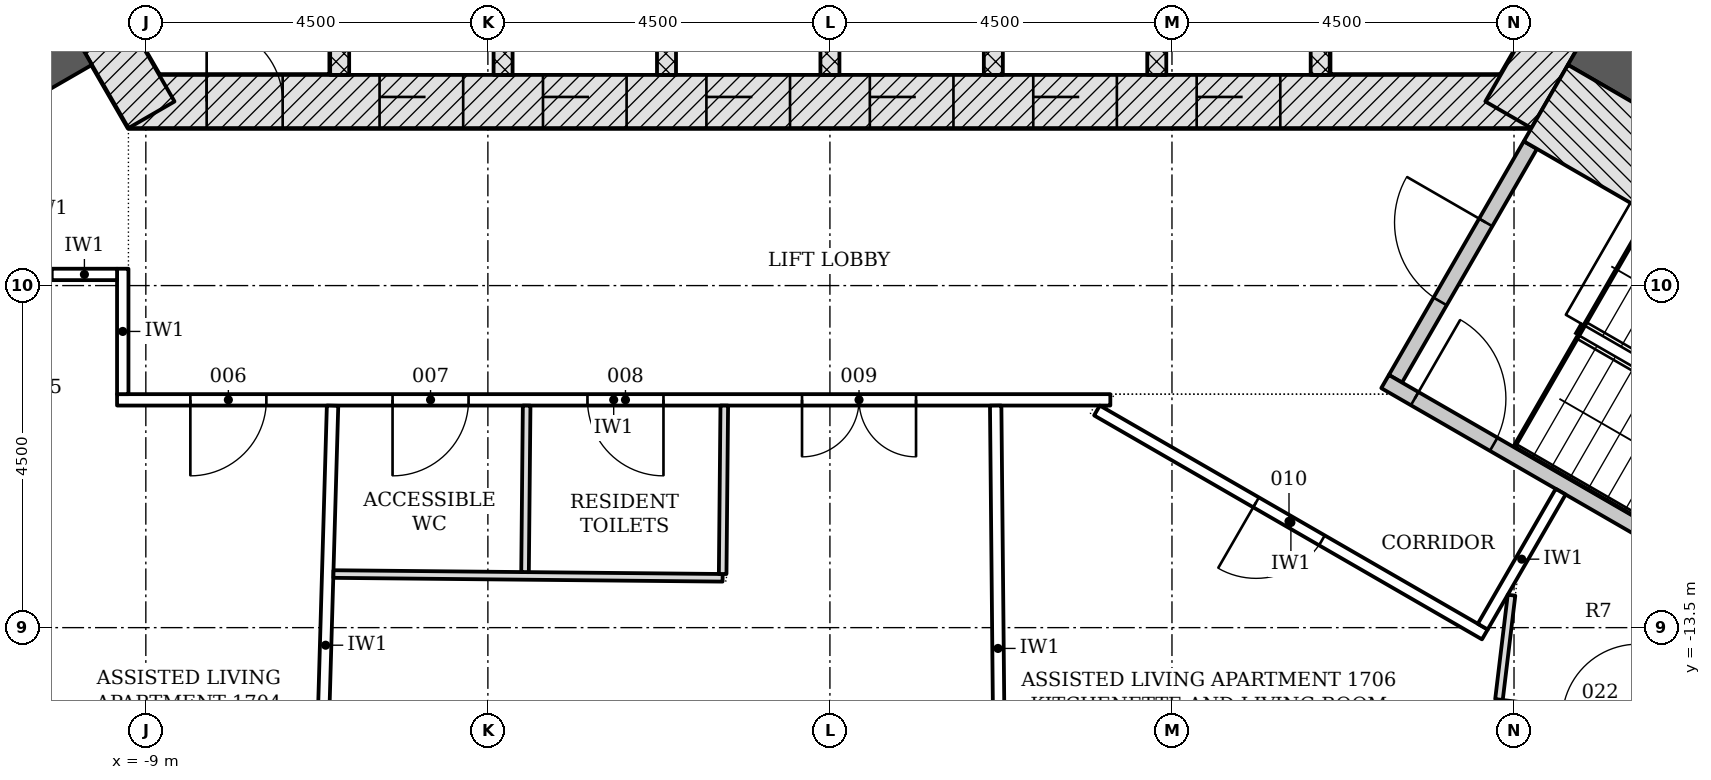
"""IFC4 building model, lengths in metres.
Left out: names, types, materials, properties, quantities, classifications, styles, units other than length and angle.
Written with IfcOpenShell. Run it as: python <this file> out.ifc"""

import sys

from ifc_helpers import new_model, si_unit, direction, frame, frame_2d, origin, place, context, subcontext, project, spatial, rectangle, extrude, element, fill, save


model = new_model("IFC4")
c1 = context("Model", 3, precision=1e-05, world=origin(), true_north=direction((0.0, 1.0)))
c2 = subcontext(c1, "Body", "Model", "MODEL_VIEW")
j1 = project(units=[si_unit("LENGTHUNIT", "METRE"), si_unit("PLANEANGLEUNIT", "RADIAN")], contexts=[c1])
p1 = place(None, origin())
s1 = spatial("IfcSite", under=j1, at=p1, CompositionType="ELEMENT")
p2 = place(p1, origin())
s2 = spatial("IfcBuilding", under=s1, at=p2, CompositionType="ELEMENT")
p3 = place(p2, frame((0.0, 0.0, 69.0)))
s3 = spatial("IfcBuildingStorey", under=s2, at=p3, CompositionType="ELEMENT", Elevation=69.0)
p4 = place(p3, frame((-9.229, -6.578, -0.2), z_axis=(0.0, 0.0, 1.0), x_axis=(1.0, 0.0, 0.0)))
e1 = element("IfcWall", 1, at=p4, inside=s3, PredefinedType="SHEAR", context=c2, shape_type="SweptSolid", body=[
    extrude(rectangle(XDim=18.458, YDim=0.7, at=frame_2d((9.229, 0.0))), origin(), (0.0, 0.0, 1.0), 3.6),
])
p5 = place(p4, frame((3.304, 0.0, 0.2)))
e2 = element("IfcOpeningElement", 2, at=p5, cuts=e1, PredefinedType="OPENING", context=c2, shape_type="SweptSolid", body=[
    extrude(rectangle(XDim=1.1, YDim=2.1, at=frame_2d((0.55, 1.05))), frame((0.0, 0.36, 0.0), z_axis=(0.0, -1.0, 0.0), x_axis=(1.0, 0.0, 0.0)), (0.0, 0.0, 1.0), 0.72),
])
p6 = place(p4, frame((5.454, 0.0, 0.2)))
e3 = element("IfcOpeningElement", 3, at=p6, cuts=e1, PredefinedType="OPENING", context=c2, shape_type="SweptSolid", body=[
    extrude(rectangle(XDim=1.1, YDim=2.1, at=frame_2d((0.55, 1.05))), frame((0.0, 0.36, 0.0), z_axis=(0.0, -1.0, 0.0), x_axis=(1.0, 0.0, 0.0)), (0.0, 0.0, 1.0), 0.72),
])
p7 = place(p4, frame((7.604, 0.0, 0.2)))
e4 = element("IfcOpeningElement", 4, at=p7, cuts=e1, PredefinedType="OPENING", context=c2, shape_type="SweptSolid", body=[
    extrude(rectangle(XDim=1.1, YDim=2.1, at=frame_2d((0.55, 1.05))), frame((0.0, 0.36, 0.0), z_axis=(0.0, -1.0, 0.0), x_axis=(1.0, 0.0, 0.0)), (0.0, 0.0, 1.0), 0.72),
])
p8 = place(p4, frame((9.754, 0.0, 0.2)))
e5 = element("IfcOpeningElement", 5, at=p8, cuts=e1, PredefinedType="OPENING", context=c2, shape_type="SweptSolid", body=[
    extrude(rectangle(XDim=1.1, YDim=2.1, at=frame_2d((0.55, 1.05))), frame((0.0, 0.36, 0.0), z_axis=(0.0, -1.0, 0.0), x_axis=(1.0, 0.0, 0.0)), (0.0, 0.0, 1.0), 0.72),
])
p9 = place(p4, frame((11.904, 0.0, 0.2)))
e6 = element("IfcOpeningElement", 6, at=p9, cuts=e1, PredefinedType="OPENING", context=c2, shape_type="SweptSolid", body=[
    extrude(rectangle(XDim=1.1, YDim=2.1, at=frame_2d((0.55, 1.05))), frame((0.0, 0.36, 0.0), z_axis=(0.0, -1.0, 0.0), x_axis=(1.0, 0.0, 0.0)), (0.0, 0.0, 1.0), 0.72),
])
p10 = place(p4, frame((14.054, 0.0, 0.2)))
e7 = element("IfcOpeningElement", 7, at=p10, cuts=e1, PredefinedType="OPENING", context=c2, shape_type="SweptSolid", body=[
    extrude(rectangle(XDim=1.1, YDim=2.1, at=frame_2d((0.55, 1.05))), frame((0.0, 0.36, 0.0), z_axis=(0.0, -1.0, 0.0), x_axis=(1.0, 0.0, 0.0)), (0.0, 0.0, 1.0), 0.72),
])
p11 = place(p4, frame((1.029, 0.0, 0.2)))
e8 = element("IfcOpeningElement", 8, at=p11, cuts=e1, PredefinedType="OPENING", context=c2, shape_type="SweptSolid", body=[
    extrude(rectangle(XDim=1.0, YDim=2.1, at=frame_2d((0.5, 1.05))), frame((0.0, 0.36, 0.0), z_axis=(0.0, -1.0, 0.0), x_axis=(1.0, 0.0, 0.0)), (0.0, 0.0, 1.0), 0.72),
])
for number, where, z_axis, x_axis in (
    (9, (8.926, -6.753, -0.2), (0.0, 0.0, 1.0), (0.5, 0.866, 0.0)),
    (10, (-10.311, -4.353, -0.2), (0.0, 0.0, 1.0), (0.5, -0.866, 0.0)),
):
    element("IfcWall", number, at=place(p3, frame(where, z_axis=z_axis, x_axis=x_axis)), inside=s3, PredefinedType="SHEAR", context=c2, shape_type="SweptSolid", body=[
        extrude(rectangle(XDim=2.771, YDim=0.7, at=frame_2d((1.386, 0.0))), origin(), (0.0, 0.0, 1.0), 3.6),
    ])
for number, where, z_axis, x_axis in (
    (11, (-9.922, -5.728, -0.2), (0.0, 0.0, 1.0), (-0.866, -0.5, 0.0)),
    (12, (9.922, -5.728, -0.2), (0.0, 0.0, 1.0), (0.866, -0.5, 0.0)),
):
    element("IfcWall", number, at=place(p3, frame(where, z_axis=z_axis, x_axis=x_axis)), inside=s3, PredefinedType="SHEAR", context=c2, shape_type="SweptSolid", body=[
        extrude(rectangle(XDim=13.381, YDim=0.85, at=frame_2d((6.691, 0.0))), origin(), (0.0, 0.0, 1.0), 3.6),
    ])
for number, where, z_axis, x_axis in (
    (13, (-6.45, -6.228, -0.2), (0.0, 0.0, 1.0), (0.0, 1.0, 0.0)),
    (14, (-4.3, -6.228, -0.2), (0.0, 0.0, 1.0), (0.0, 1.0, 0.0)),
    (15, (-2.15, -6.228, -0.2), (0.0, 0.0, 1.0), (0.0, 1.0, 0.0)),
    (16, (0.0, -6.228, -0.2), (0.0, 0.0, 1.0), (0.0, 1.0, 0.0)),
    (17, (2.15, -6.228, -0.2), (0.0, 0.0, 1.0), (0.0, 1.0, 0.0)),
    (18, (4.3, -6.228, -0.2), (0.0, 0.0, 1.0), (0.0, 1.0, 0.0)),
    (19, (6.45, -6.228, -0.2), (0.0, 0.0, 1.0), (0.0, 1.0, 0.0)),
):
    element("IfcWall", number, at=place(p3, frame(where, z_axis=z_axis, x_axis=x_axis)), inside=s3, PredefinedType="PARTITIONING", context=c2, shape_type="SweptSolid", body=[
        extrude(rectangle(XDim=2.5, YDim=0.25, at=frame_2d((1.25, 0.0))), origin(), (0.0, 0.0, 1.0), 3.6),
    ])
p12 = place(p3, frame((-10.424, -4.858, -0.2), z_axis=(0.0, 0.0, 1.0), x_axis=(-0.866033125095, -0.499986626058, 0.0)))
e20 = element("IfcWall", 20, at=p12, inside=s3, PredefinedType="SHEAR", context=c2, shape_type="SweptSolid", body=[
    extrude(rectangle(XDim=7.2, YDim=1.161, at=frame_2d((3.6, 0.0))), origin(), (0.0, 0.0, 1.0), 3.6),
])
p13 = place(p3, frame((7.44, -10.226, -0.2), z_axis=(0.0, 0.0, 1.0), x_axis=(0.500022077904, 0.866012656725, 0.0)))
e21 = element("IfcWall", 21, at=p13, inside=s3, PredefinedType="SHEAR", context=c2, shape_type="SweptSolid", body=[
    extrude(rectangle(XDim=3.55, YDim=0.2, at=frame_2d((1.775, 0.0))), origin(), (0.0, 0.0, 1.0), 3.6),
])
p14 = place(p13, frame((1.175, 0.0, 0.2)))
e22 = element("IfcOpeningElement", 22, at=p14, cuts=e21, PredefinedType="OPENING", context=c2, shape_type="SweptSolid", body=[
    extrude(rectangle(XDim=1.2, YDim=2.1, at=frame_2d((0.6, 1.05))), frame((0.0, 0.11, 0.0), z_axis=(0.0, -1.0, 0.0), x_axis=(1.0, 0.0, 0.0)), (0.0, 0.0, 1.0), 0.22),
])
p15 = place(p3, frame((7.304, -10.262, -0.2), z_axis=(0.0, 0.0, 1.0), x_axis=(0.866026594901, -0.49999793692, 0.0)))
e23 = element("IfcWall", 23, at=p15, inside=s3, PredefinedType="SHEAR", context=c2, shape_type="SweptSolid", body=[
    extrude(rectangle(XDim=5.6, YDim=0.2, at=frame_2d((2.8, 0.0))), origin(), (0.0, 0.0, 1.0), 3.6),
])
p16 = place(p15, frame((0.45, 0.0, 0.2)))
e24 = element("IfcOpeningElement", 24, at=p16, cuts=e23, PredefinedType="OPENING", context=c2, shape_type="SweptSolid", body=[
    extrude(rectangle(XDim=1.2, YDim=2.1, at=frame_2d((0.6, 1.05))), frame((0.0, 0.11, 0.0), z_axis=(0.0, -1.0, 0.0), x_axis=(1.0, 0.0, 0.0)), (0.0, 0.0, 1.0), 0.22),
])
p17 = place(p3, frame((9.419, -6.599, -0.2), z_axis=(0.0, 0.0, 1.0), x_axis=(0.866033125095, -0.499986626058, 0.0)))
e25 = element("IfcWall", 25, at=p17, inside=s3, PredefinedType="SHEAR", context=c2, shape_type="SweptSolid", body=[
    extrude(rectangle(XDim=7.2, YDim=1.161, at=frame_2d((3.6, 0.0))), origin(), (0.0, 0.0, 1.0), 3.6),
])
p18 = place(p3, frame((3.689, -10.503, 0.0), z_axis=(0.0, 0.0, 1.0), x_axis=(-1.0, 0.0, 0.0)))
e26 = element("IfcWall", 26, at=p18, inside=s3, PredefinedType="PARTITIONING", context=c2, shape_type="SweptSolid", body=[
    extrude(rectangle(XDim=13.068, YDim=0.15, at=frame_2d((6.534, 0.0))), origin(), (0.0, 0.0, 1.0), 2.778),
])
p19 = place(p18, frame((11.103, 0.0, 0.0)))
e27 = element("IfcOpeningElement", 27, at=p19, cuts=e26, PredefinedType="OPENING", context=c2, shape_type="SweptSolid", body=[
    extrude(rectangle(XDim=1.0, YDim=2.1, at=frame_2d((0.5, 1.05))), frame((0.0, 0.085, 0.0), z_axis=(0.0, -1.0, 0.0), x_axis=(1.0, 0.0, 0.0)), (0.0, 0.0, 1.0), 0.17),
])
p20 = place(p18, frame((8.443, 0.0, 0.0)))
e28 = element("IfcOpeningElement", 28, at=p20, cuts=e26, PredefinedType="OPENING", context=c2, shape_type="SweptSolid", body=[
    extrude(rectangle(XDim=1.0, YDim=2.1, at=frame_2d((0.5, 1.05))), frame((0.0, 0.085, 0.0), z_axis=(0.0, -1.0, 0.0), x_axis=(1.0, 0.0, 0.0)), (0.0, 0.0, 1.0), 0.17),
])
p21 = place(p18, frame((5.879, 0.0, 0.0)))
e29 = element("IfcOpeningElement", 29, at=p21, cuts=e26, PredefinedType="OPENING", context=c2, shape_type="SweptSolid", body=[
    extrude(rectangle(XDim=1.0, YDim=2.1, at=frame_2d((0.5, 1.05))), frame((0.0, 0.085, 0.0), z_axis=(0.0, -1.0, 0.0), x_axis=(1.0, 0.0, 0.0)), (0.0, 0.0, 1.0), 0.17),
])
p22 = place(p18, frame((2.556, 0.0, 0.0)))
e30 = element("IfcOpeningElement", 30, at=p22, cuts=e26, PredefinedType="OPENING", context=c2, shape_type="SweptSolid", body=[
    extrude(rectangle(XDim=1.5, YDim=2.1, at=frame_2d((0.75, 1.05))), frame((0.0, 0.085, 0.0), z_axis=(0.0, -1.0, 0.0), x_axis=(1.0, 0.0, 0.0)), (0.0, 0.0, 1.0), 0.17),
])
p23 = place(p3, frame((8.616, -13.589, 0.0), z_axis=(0.0, 0.0, 1.0), x_axis=(-0.866039313704, 0.499975906538, 0.0)))
e31 = element("IfcWall", 31, at=p23, inside=s3, PredefinedType="PARTITIONING", context=c2, shape_type="SweptSolid", body=[
    extrude(rectangle(XDim=5.892, YDim=0.15, at=frame_2d((2.946, 0.0))), origin(), (0.0, 0.0, 1.0), 2.778),
])
p24 = place(p23, frame((2.475, 0.0, 0.0)))
e32 = element("IfcOpeningElement", 32, at=p24, cuts=e31, PredefinedType="OPENING", context=c2, shape_type="SweptSolid", body=[
    extrude(rectangle(XDim=1.0, YDim=2.1, at=frame_2d((0.5, 1.05))), frame((0.0, 0.085, 0.0), z_axis=(0.0, -1.0, 0.0), x_axis=(1.0, 0.0, 0.0)), (0.0, 0.0, 1.0), 0.17),
])
p25 = place(p3, frame((8.589, -13.487, 0.0), z_axis=(0.0, 0.0, 1.0), x_axis=(0.499956128963, 0.866050731258, 0.0)))
e33 = element("IfcWall", 33, at=p25, inside=s3, PredefinedType="PARTITIONING", context=c2, shape_type="SweptSolid", body=[
    extrude(rectangle(XDim=2.05, YDim=0.15, at=frame_2d((1.025, 0.0))), origin(), (0.0, 0.0, 1.0), 3.4),
])
p26 = place(p3, frame((-9.304, -10.428, 0.0), z_axis=(0.0, 0.0, 1.0), x_axis=(0.0, 1.0, 0.0)))
e34 = element("IfcWall", 34, at=p26, inside=s3, PredefinedType="PARTITIONING", context=c2, shape_type="SweptSolid", body=[
    extrude(rectangle(XDim=1.65, YDim=0.15, at=frame_2d((0.825, 0.0))), origin(), (0.0, 0.0, 1.0), 3.4),
])
p27 = place(p3, frame((-10.238, -8.853, 0.0), z_axis=(0.0, 0.0, 1.0), x_axis=(1.0, 0.0, 0.0)))
e35 = element("IfcWall", 35, at=p27, inside=s3, PredefinedType="PARTITIONING", context=c2, shape_type="SweptSolid", body=[
    extrude(rectangle(XDim=0.859, YDim=0.15, at=frame_2d((0.43, 0.0))), origin(), (0.0, 0.0, 1.0), 3.4),
])
p28 = place(p3, frame((2.242, -16.968, 0.0), z_axis=(0.0, 0.0, 1.0), x_axis=(-0.009628532285, 0.999953644609, 0.0)))
e36 = element("IfcWall", 36, at=p28, inside=s3, PredefinedType="PARTITIONING", context=c2, shape_type="SweptSolid", body=[
    extrude(rectangle(XDim=6.39, YDim=0.15, at=frame_2d((3.195, 0.0))), origin(), (0.0, 0.0, 1.0), 2.778),
])
p29 = place(p3, frame((-6.726, -16.882, 0.0), z_axis=(0.0, 0.0, 1.0), x_axis=(0.028929036321, 0.999581467844, 0.0)))
e37 = element("IfcWall", 37, at=p29, inside=s3, PredefinedType="PARTITIONING", context=c2, shape_type="SweptSolid", body=[
    extrude(rectangle(XDim=6.304, YDim=0.15, at=frame_2d((3.152, 0.0))), origin(), (0.0, 0.0, 1.0), 2.778),
])
p30 = place(p3, frame((-6.531, -12.795, 0.0), z_axis=(0.0, 0.0, 1.0), x_axis=(0.99995315176, -0.009679580841, 0.0)))
e38 = element("IfcWall", 38, at=p30, inside=s3, PredefinedType="PARTITIONING", context=c2, shape_type="SweptSolid", body=[
    extrude(rectangle(XDim=5.12, YDim=0.1, at=frame_2d((2.56, 0.0))), origin(), (0.0, 0.0, 1.0), 2.778),
])
p31 = place(p3, frame((8.796, -14.496, 0.0), z_axis=(0.0, 0.0, 1.0), x_axis=(0.992835802838, -0.119486687973, 0.0)))
e39 = element("IfcWall", 39, at=p31, inside=s3, PredefinedType="PARTITIONING", context=c2, shape_type="SweptSolid", body=[
    extrude(rectangle(XDim=2.65, YDim=0.1, at=frame_2d((1.325, 0.0))), origin(), (0.0, 0.0, 1.0), 2.923),
])
p32 = place(p31, frame((0.85, 0.0, 0.0)))
e40 = element("IfcOpeningElement", 40, at=p32, cuts=e39, PredefinedType="OPENING", context=c2, shape_type="SweptSolid", body=[
    extrude(rectangle(XDim=1.0, YDim=2.1, at=frame_2d((0.5, 1.05))), frame((0.0, 0.06, 0.0), z_axis=(0.0, -1.0, 0.0), x_axis=(1.0, 0.0, 0.0)), (0.0, 0.0, 1.0), 0.12),
])
p33 = place(p3, frame((-1.411, -12.794, 0.0), z_axis=(0.0, 0.0, 1.0), x_axis=(0.009585280215, 0.999954060146, 0.0)))
e41 = element("IfcWall", 41, at=p33, inside=s3, PredefinedType="PARTITIONING", context=c2, shape_type="SweptSolid", body=[
    extrude(rectangle(XDim=2.216, YDim=0.1, at=frame_2d((1.108, 0.0))), origin(), (0.0, 0.0, 1.0), 3.4),
])
p34 = place(p3, frame((-4.011, -12.769, 0.0), z_axis=(0.0, 0.0, 1.0), x_axis=(0.009583868309, 0.99995407368, 0.0)))
e42 = element("IfcWall", 42, at=p34, inside=s3, PredefinedType="PARTITIONING", context=c2, shape_type="SweptSolid", body=[
    extrude(rectangle(XDim=2.191, YDim=0.1, at=frame_2d((1.095, 0.0))), origin(), (0.0, 0.0, 1.0), 3.4),
])
p35 = place(p3, frame((8.967, -13.073, 0.0), z_axis=(0.0, 0.0, 1.0), x_axis=(-0.119493210152, -0.992835017879, 0.0)))
e43 = element("IfcWall", 43, at=p35, inside=s3, PredefinedType="PARTITIONING", context=c2, shape_type="SweptSolid", body=[
    extrude(rectangle(XDim=1.383, YDim=0.1, at=frame_2d((0.692, 0.0))), origin(), (0.0, 0.0, 1.0), 3.4),
])
p36 = place(p5, origin())
e44 = element("IfcDoor", 44, at=p36, inside=s3, OperationType="DOUBLE_DOOR_SLIDING", PredefinedType="DOOR", context=c2, shape_type="SweptSolid", body=[
    extrude(rectangle(XDim=1.1, YDim=2.1, at=frame_2d((0.55, 1.05))), frame((0.0, 0.025, 0.0), z_axis=(0.0, -1.0, 0.0), x_axis=(1.0, 0.0, 0.0)), (0.0, 0.0, 1.0), 0.05),
])
fill(e2, e44)
p37 = place(p6, origin())
e45 = element("IfcDoor", 45, at=p37, inside=s3, OperationType="DOUBLE_DOOR_SLIDING", PredefinedType="DOOR", context=c2, shape_type="SweptSolid", body=[
    extrude(rectangle(XDim=1.1, YDim=2.1, at=frame_2d((0.55, 1.05))), frame((0.0, 0.025, 0.0), z_axis=(0.0, -1.0, 0.0), x_axis=(1.0, 0.0, 0.0)), (0.0, 0.0, 1.0), 0.05),
])
fill(e3, e45)
p38 = place(p7, origin())
e46 = element("IfcDoor", 46, at=p38, inside=s3, OperationType="DOUBLE_DOOR_SLIDING", PredefinedType="DOOR", context=c2, shape_type="SweptSolid", body=[
    extrude(rectangle(XDim=1.1, YDim=2.1, at=frame_2d((0.55, 1.05))), frame((0.0, 0.025, 0.0), z_axis=(0.0, -1.0, 0.0), x_axis=(1.0, 0.0, 0.0)), (0.0, 0.0, 1.0), 0.05),
])
fill(e4, e46)
p39 = place(p8, origin())
e47 = element("IfcDoor", 47, at=p39, inside=s3, OperationType="DOUBLE_DOOR_SLIDING", PredefinedType="DOOR", context=c2, shape_type="SweptSolid", body=[
    extrude(rectangle(XDim=1.1, YDim=2.1, at=frame_2d((0.55, 1.05))), frame((0.0, 0.025, 0.0), z_axis=(0.0, -1.0, 0.0), x_axis=(1.0, 0.0, 0.0)), (0.0, 0.0, 1.0), 0.05),
])
fill(e5, e47)
p40 = place(p9, origin())
e48 = element("IfcDoor", 48, at=p40, inside=s3, OperationType="DOUBLE_DOOR_SLIDING", PredefinedType="DOOR", context=c2, shape_type="SweptSolid", body=[
    extrude(rectangle(XDim=1.1, YDim=2.1, at=frame_2d((0.55, 1.05))), frame((0.0, 0.025, 0.0), z_axis=(0.0, -1.0, 0.0), x_axis=(1.0, 0.0, 0.0)), (0.0, 0.0, 1.0), 0.05),
])
fill(e6, e48)
p41 = place(p10, origin())
e49 = element("IfcDoor", 49, at=p41, inside=s3, OperationType="DOUBLE_DOOR_SLIDING", PredefinedType="DOOR", context=c2, shape_type="SweptSolid", body=[
    extrude(rectangle(XDim=1.1, YDim=2.1, at=frame_2d((0.55, 1.05))), frame((0.0, 0.025, 0.0), z_axis=(0.0, -1.0, 0.0), x_axis=(1.0, 0.0, 0.0)), (0.0, 0.0, 1.0), 0.05),
])
fill(e7, e49)
p42 = place(p11, origin())
e50 = element("IfcDoor", 50, at=p42, inside=s3, OperationType="SINGLE_SWING_LEFT", PredefinedType="DOOR", context=c2, shape_type="SweptSolid", body=[
    extrude(rectangle(XDim=1.0, YDim=2.1, at=frame_2d((0.5, 1.05))), frame((0.0, 0.075, 0.0), z_axis=(0.0, -1.0, 0.0), x_axis=(1.0, 0.0, 0.0)), (0.0, 0.0, 1.0), 0.15),
])
fill(e8, e50)
p43 = place(p14, origin())
e51 = element("IfcDoor", 51, at=p43, inside=s3, OperationType="SINGLE_SWING_RIGHT", PredefinedType="DOOR", context=c2, shape_type="SweptSolid", body=[
    extrude(rectangle(XDim=1.2, YDim=2.1, at=frame_2d((0.6, 1.05))), frame((0.0, 0.025, 0.0), z_axis=(0.0, -1.0, 0.0), x_axis=(1.0, 0.0, 0.0)), (0.0, 0.0, 1.0), 0.05),
])
fill(e22, e51)
p44 = place(p16, origin())
e52 = element("IfcDoor", 52, at=p44, inside=s3, OperationType="SINGLE_SWING_LEFT", PredefinedType="DOOR", context=c2, shape_type="SweptSolid", body=[
    extrude(rectangle(XDim=1.2, YDim=2.1, at=frame_2d((0.6, 1.05))), frame((0.0, 0.025, 0.0), z_axis=(0.0, -1.0, 0.0), x_axis=(1.0, 0.0, 0.0)), (0.0, 0.0, 1.0), 0.05),
])
fill(e24, e52)
p45 = place(p19, origin())
e53 = element("IfcDoor", 53, at=p45, inside=s3, OperationType="SINGLE_SWING_RIGHT", PredefinedType="DOOR", context=c2, shape_type="SweptSolid", body=[
    extrude(rectangle(XDim=1.0, YDim=2.1, at=frame_2d((0.5, 1.05))), frame((0.0, 0.025, 0.0), z_axis=(0.0, -1.0, 0.0), x_axis=(1.0, 0.0, 0.0)), (0.0, 0.0, 1.0), 0.05),
])
fill(e27, e53)
p46 = place(p20, origin())
e54 = element("IfcDoor", 54, at=p46, inside=s3, OperationType="SINGLE_SWING_RIGHT", PredefinedType="DOOR", context=c2, shape_type="SweptSolid", body=[
    extrude(rectangle(XDim=1.0, YDim=2.1, at=frame_2d((0.5, 1.05))), frame((0.0, 0.025, 0.0), z_axis=(0.0, -1.0, 0.0), x_axis=(1.0, 0.0, 0.0)), (0.0, 0.0, 1.0), 0.05),
])
fill(e28, e54)
p47 = place(p21, origin())
e55 = element("IfcDoor", 55, at=p47, inside=s3, OperationType="SINGLE_SWING_LEFT", PredefinedType="DOOR", context=c2, shape_type="SweptSolid", body=[
    extrude(rectangle(XDim=1.0, YDim=2.1, at=frame_2d((0.5, 1.05))), frame((0.0, 0.025, 0.0), z_axis=(0.0, -1.0, 0.0), x_axis=(1.0, 0.0, 0.0)), (0.0, 0.0, 1.0), 0.05),
])
fill(e29, e55)
p48 = place(p22, origin())
e56 = element("IfcDoor", 56, at=p48, inside=s3, OperationType="DOUBLE_DOOR_SINGLE_SWING", PredefinedType="DOOR", context=c2, shape_type="SweptSolid", body=[
    extrude(rectangle(XDim=1.5, YDim=2.1, at=frame_2d((0.75, 1.05))), frame((0.0, 0.025, 0.0), z_axis=(0.0, -1.0, 0.0), x_axis=(1.0, 0.0, 0.0)), (0.0, 0.0, 1.0), 0.05),
])
fill(e30, e56)
p49 = place(p24, origin())
e57 = element("IfcDoor", 57, at=p49, inside=s3, OperationType="SINGLE_SWING_RIGHT", PredefinedType="DOOR", context=c2, shape_type="SweptSolid", body=[
    extrude(rectangle(XDim=1.0, YDim=2.1, at=frame_2d((0.5, 1.05))), frame((0.0, 0.025, 0.0), z_axis=(0.0, -1.0, 0.0), x_axis=(1.0, 0.0, 0.0)), (0.0, 0.0, 1.0), 0.05),
])
fill(e32, e57)
save(model, sys.argv[1])
